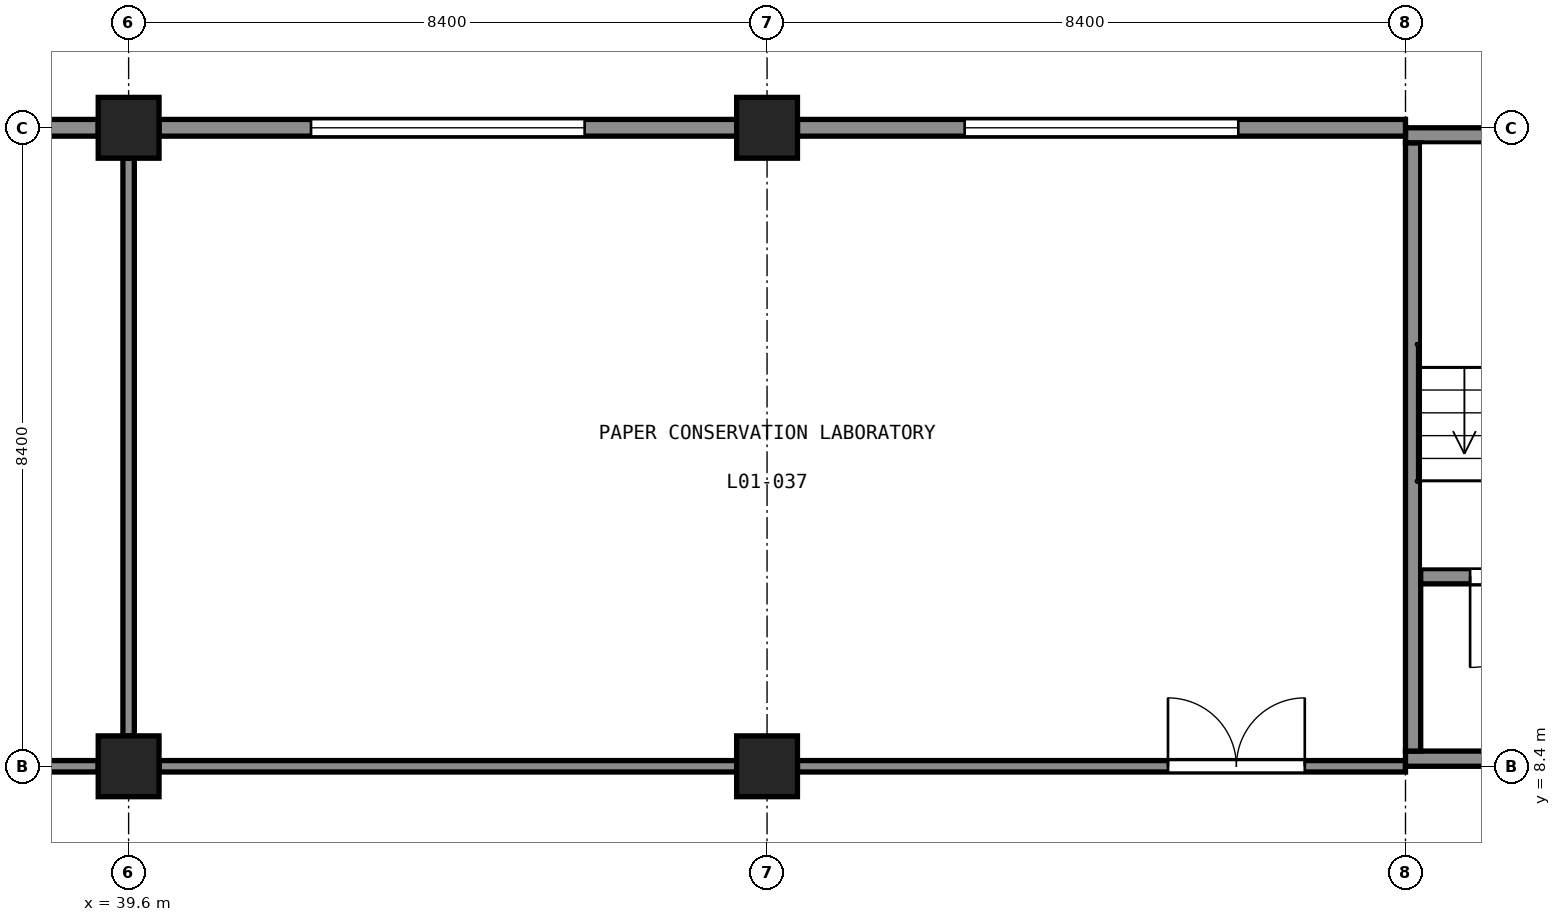
"""IFC4 building model, lengths in metres.
Left out: names, types, materials, properties, quantities, classifications, styles, units other than length and angle.
Written with IfcOpenShell. Run it as: python <this file> out.ifc"""

import sys

from ifc_helpers import new_model, si_unit, direction, frame, frame_2d, origin, origin_2d, place, context, subcontext, project, spatial, rectangle, extrude, element, fill, save


model = new_model("IFC4")
c1 = context("Model", 3, precision=1e-05, world=origin(), true_north=direction((0.0, 1.0)))
c2 = subcontext(c1, "Body", "Model", "MODEL_VIEW")
j1 = project(units=[si_unit("LENGTHUNIT", "METRE"), si_unit("PLANEANGLEUNIT", "RADIAN")], contexts=[c1])
p1 = place(None, origin())
s1 = spatial("IfcSite", under=j1, at=p1, CompositionType="ELEMENT")
p2 = place(p1, origin())
s2 = spatial("IfcBuilding", under=s1, at=p2, CompositionType="ELEMENT")
p3 = place(p2, frame((0.0, 0.0, 5.5)))
s3 = spatial("IfcBuildingStorey", under=s2, at=p3, CompositionType="ELEMENT", Elevation=5.5)
p4 = place(p3, frame((56.4, 8.5, 0.0), z_axis=(0.0, 0.0, 1.0), x_axis=(1.0, 0.0, 0.0)))
e1 = element("IfcWall", 1, at=p4, inside=s3, PredefinedType="SHEAR", context=c2, shape_type="SweptSolid", body=[
    extrude(rectangle(XDim=8.4, YDim=0.2, at=frame_2d((4.2, 0.0))), origin(), (0.0, 0.0, 1.0), 5.0),
])
p5 = place(p4, frame((3.3, 0.0, 0.0)))
e2 = element("IfcOpeningElement", 2, at=p5, cuts=e1, PredefinedType="OPENING", context=c2, shape_type="SweptSolid", body=[
    extrude(rectangle(XDim=1.8, YDim=2.1, at=frame_2d((0.9, 1.05))), frame((0.0, 0.11, 0.0), z_axis=(0.0, -1.0, 0.0), x_axis=(1.0, 0.0, 0.0)), (0.0, 0.0, 1.0), 0.22),
])
p6 = place(p3, frame((56.4, 16.7, 0.0), z_axis=(0.0, 0.0, 1.0), x_axis=(1.0, 0.0, 0.0)))
e3 = element("IfcWall", 3, at=p6, inside=s3, PredefinedType="SHEAR", context=c2, shape_type="SweptSolid", body=[
    extrude(rectangle(XDim=8.4, YDim=0.2, at=frame_2d((4.2, 0.0))), origin(), (0.0, 0.0, 1.0), 5.0),
])
p7 = place(p3, frame((56.5, 8.6, 0.0), z_axis=(0.0, 0.0, 1.0), x_axis=(0.0, 1.0, 0.0)))
e4 = element("IfcWall", 4, at=p7, inside=s3, PredefinedType="SHEAR", context=c2, shape_type="SweptSolid", body=[
    extrude(rectangle(XDim=8.0, YDim=0.2, at=frame_2d((4.0, 0.0))), origin(), (0.0, 0.0, 1.0), 5.0),
])
p8 = place(p3, frame((56.6, 10.9, 0.0), z_axis=(0.0, 0.0, 1.0), x_axis=(1.0, 0.0, 0.0)))
e5 = element("IfcWall", 5, at=p8, inside=s3, PredefinedType="SHEAR", context=c2, shape_type="SweptSolid", body=[
    extrude(rectangle(XDim=8.0, YDim=0.2, at=frame_2d((4.0, 0.0))), origin(), (0.0, 0.0, 1.0), 5.0),
])
p9 = place(p8, frame((0.65, 0.0, 0.0)))
e6 = element("IfcOpeningElement", 6, at=p9, cuts=e5, PredefinedType="OPENING", context=c2, shape_type="SweptSolid", body=[
    extrude(rectangle(XDim=1.2, YDim=2.1, at=frame_2d((0.6, 1.05))), frame((0.0, 0.11, 0.0), z_axis=(0.0, -1.0, 0.0), x_axis=(1.0, 0.0, 0.0)), (0.0, 0.0, 1.0), 0.22),
])
p10 = place(p8, frame((6.15, 0.0, 0.0)))
e7 = element("IfcOpeningElement", 7, at=p10, cuts=e5, PredefinedType="OPENING", context=c2, shape_type="SweptSolid", body=[
    extrude(rectangle(XDim=1.2, YDim=2.1, at=frame_2d((0.6, 1.05))), frame((0.0, 0.11, 0.0), z_axis=(0.0, -1.0, 0.0), x_axis=(1.0, 0.0, 0.0)), (0.0, 0.0, 1.0), 0.22),
])
p11 = place(p8, frame((3.45, 0.0, 0.0)))
e8 = element("IfcOpeningElement", 8, at=p11, cuts=e5, PredefinedType="OPENING", context=c2, shape_type="SweptSolid", body=[
    extrude(rectangle(XDim=1.1, YDim=2.1, at=frame_2d((0.55, 1.05))), frame((0.0, 0.11, 0.0), z_axis=(0.0, -1.0, 0.0), x_axis=(1.0, 0.0, 0.0)), (0.0, 0.0, 1.0), 0.22),
])
for number, where, z_axis, x_axis in (
    (9, (39.6, 8.4, 0.0), (0.0, 0.0, 1.0), (1.0, 0.0, 0.0)),
    (10, (39.6, 16.8, 0.0), (0.0, 0.0, 1.0), (1.0, 0.0, 0.0)),
    (11, (48.0, 8.4, 0.0), (0.0, 0.0, 1.0), (1.0, 0.0, 0.0)),
    (12, (48.0, 16.8, 0.0), (0.0, 0.0, 1.0), (1.0, 0.0, 0.0)),
):
    element("IfcColumn", number, at=place(p3, frame(where, z_axis=z_axis, x_axis=x_axis)), inside=s3, PredefinedType="COLUMN", context=c2, shape_type="SweptSolid", body=[
        extrude(rectangle(XDim=0.8, YDim=0.8, at=origin_2d()), origin(), (0.0, 0.0, 1.0), 5.0),
    ])
p12 = place(p3, frame((48.4, 16.8, 0.0), z_axis=(0.0, 0.0, 1.0), x_axis=(1.0, 0.0, 0.0)))
e13 = element("IfcWall", 13, at=p12, inside=s3, PredefinedType="SOLIDWALL", context=c2, shape_type="SweptSolid", body=[
    extrude(rectangle(XDim=8.0, YDim=0.22, at=frame_2d((4.0, 0.0))), origin(), (0.0, 0.0, 1.0), 3.94),
])
p13 = place(p12, frame((2.2, 0.0, 0.9)))
e14 = element("IfcOpeningElement", 14, at=p13, cuts=e13, PredefinedType="OPENING", context=c2, shape_type="SweptSolid", body=[
    extrude(rectangle(XDim=3.6, YDim=1.5, at=frame_2d((1.8, 0.75))), frame((0.0, 0.12, 0.0), z_axis=(0.0, -1.0, 0.0), x_axis=(1.0, 0.0, 0.0)), (0.0, 0.0, 1.0), 0.24),
])
p14 = place(p3, frame((40.0, 16.8, 0.0), z_axis=(0.0, 0.0, 1.0), x_axis=(1.0, 0.0, 0.0)))
e15 = element("IfcWall", 15, at=p14, inside=s3, PredefinedType="SOLIDWALL", context=c2, shape_type="SweptSolid", body=[
    extrude(rectangle(XDim=7.6, YDim=0.22, at=frame_2d((3.8, 0.0))), origin(), (0.0, 0.0, 1.0), 3.94),
])
p15 = place(p14, frame((2.0, 0.0, 0.9)))
e16 = element("IfcOpeningElement", 16, at=p15, cuts=e15, PredefinedType="OPENING", context=c2, shape_type="SweptSolid", body=[
    extrude(rectangle(XDim=3.6, YDim=1.5, at=frame_2d((1.8, 0.75))), frame((0.0, 0.12, 0.0), z_axis=(0.0, -1.0, 0.0), x_axis=(1.0, 0.0, 0.0)), (0.0, 0.0, 1.0), 0.24),
])
p16 = place(p3, frame((31.6, 16.8, 0.0), z_axis=(0.0, 0.0, 1.0), x_axis=(1.0, 0.0, 0.0)))
e17 = element("IfcWall", 17, at=p16, inside=s3, PredefinedType="SOLIDWALL", context=c2, shape_type="SweptSolid", body=[
    extrude(rectangle(XDim=7.6, YDim=0.22, at=frame_2d((3.8, 0.0))), origin(), (0.0, 0.0, 1.0), 3.94),
])
p17 = place(p16, frame((2.0, 0.0, 0.9)))
e18 = element("IfcOpeningElement", 18, at=p17, cuts=e17, PredefinedType="OPENING", context=c2, shape_type="SweptSolid", body=[
    extrude(rectangle(XDim=3.6, YDim=1.5, at=frame_2d((1.8, 0.75))), frame((0.0, 0.12, 0.0), z_axis=(0.0, -1.0, 0.0), x_axis=(1.0, 0.0, 0.0)), (0.0, 0.0, 1.0), 0.24),
])
p18 = place(p3, frame((39.6, 8.8, 0.0), z_axis=(0.0, 0.0, 1.0), x_axis=(0.0, 1.0, 0.0)))
e19 = element("IfcWall", 19, at=p18, inside=s3, PredefinedType="PARTITIONING", context=c2, shape_type="SweptSolid", body=[
    extrude(rectangle(XDim=7.6, YDim=0.15, at=frame_2d((3.8, 0.0))), origin(), (0.0, 0.0, 1.0), 3.9),
])
p19 = place(p3, frame((31.6, 8.4, 0.0), z_axis=(0.0, 0.0, 1.0), x_axis=(1.0, 0.0, 0.0)))
e20 = element("IfcWall", 20, at=p19, inside=s3, PredefinedType="PARTITIONING", context=c2, shape_type="SweptSolid", body=[
    extrude(rectangle(XDim=7.6, YDim=0.15, at=frame_2d((3.8, 0.0))), origin(), (0.0, 0.0, 1.0), 3.9),
])
p20 = place(p19, frame((4.675, 0.0, 0.0)))
e21 = element("IfcOpeningElement", 21, at=p20, cuts=e20, PredefinedType="OPENING", context=c2, shape_type="SweptSolid", body=[
    extrude(rectangle(XDim=1.8, YDim=2.1, at=frame_2d((0.9, 1.05))), frame((0.0, 0.085, 0.0), z_axis=(0.0, -1.0, 0.0), x_axis=(1.0, 0.0, 0.0)), (0.0, 0.0, 1.0), 0.17),
])
p21 = place(p3, frame((40.0, 8.4, 0.0), z_axis=(0.0, 0.0, 1.0), x_axis=(1.0, 0.0, 0.0)))
e22 = element("IfcWall", 22, at=p21, inside=s3, PredefinedType="PARTITIONING", context=c2, shape_type="SweptSolid", body=[
    extrude(rectangle(XDim=7.6, YDim=0.15, at=frame_2d((3.8, 0.0))), origin(), (0.0, 0.0, 1.0), 3.9),
])
p22 = place(p3, frame((48.4, 8.4, 0.0), z_axis=(0.0, 0.0, 1.0), x_axis=(1.0, 0.0, 0.0)))
e23 = element("IfcWall", 23, at=p22, inside=s3, PredefinedType="PARTITIONING", context=c2, shape_type="SweptSolid", body=[
    extrude(rectangle(XDim=8.0, YDim=0.15, at=frame_2d((4.0, 0.0))), origin(), (0.0, 0.0, 1.0), 3.9),
])
p23 = place(p22, frame((4.875, 0.0, 0.0)))
e24 = element("IfcOpeningElement", 24, at=p23, cuts=e23, PredefinedType="OPENING", context=c2, shape_type="SweptSolid", body=[
    extrude(rectangle(XDim=1.8, YDim=2.1, at=frame_2d((0.9, 1.05))), frame((0.0, 0.085, 0.0), z_axis=(0.0, -1.0, 0.0), x_axis=(1.0, 0.0, 0.0)), (0.0, 0.0, 1.0), 0.17),
])
p24 = place(p13, origin())
e25 = element("IfcWindow", 25, at=p24, inside=s3, PartitioningType="DOUBLE_PANEL_VERTICAL", PredefinedType="WINDOW", context=c2, shape_type="SweptSolid", body=[
    extrude(rectangle(XDim=3.6, YDim=1.5, at=frame_2d((1.8, 0.75))), frame((0.0, -0.03, 0.0), z_axis=(0.0, -1.0, 0.0), x_axis=(1.0, 0.0, 0.0)), (0.0, 0.0, 1.0), 0.06),
])
fill(e14, e25)
p25 = place(p15, origin())
e26 = element("IfcWindow", 26, at=p25, inside=s3, PartitioningType="DOUBLE_PANEL_VERTICAL", PredefinedType="WINDOW", context=c2, shape_type="SweptSolid", body=[
    extrude(rectangle(XDim=3.6, YDim=1.5, at=frame_2d((1.8, 0.75))), frame((0.0, -0.03, 0.0), z_axis=(0.0, -1.0, 0.0), x_axis=(1.0, 0.0, 0.0)), (0.0, 0.0, 1.0), 0.06),
])
fill(e16, e26)
p26 = place(p23, origin())
e27 = element("IfcDoor", 27, at=p26, inside=s3, OperationType="DOUBLE_DOOR_SINGLE_SWING", PredefinedType="DOOR", context=c2, shape_type="SweptSolid", body=[
    extrude(rectangle(XDim=1.8, YDim=2.1, at=frame_2d((0.9, 1.05))), frame((0.0, 0.025, 0.0), z_axis=(0.0, -1.0, 0.0), x_axis=(1.0, 0.0, 0.0)), (0.0, 0.0, 1.0), 0.05),
])
fill(e24, e27)
p27 = place(p9, origin())
e28 = element("IfcDoor", 28, at=p27, inside=s3, OperationType="SINGLE_SWING_LEFT", PredefinedType="DOOR", context=c2, shape_type="SweptSolid", body=[
    extrude(rectangle(XDim=1.2, YDim=2.1, at=frame_2d((0.6, 1.05))), frame((0.0, 0.025, 0.0), z_axis=(0.0, -1.0, 0.0), x_axis=(1.0, 0.0, 0.0)), (0.0, 0.0, 1.0), 0.05),
])
fill(e6, e28)
save(model, sys.argv[1])
